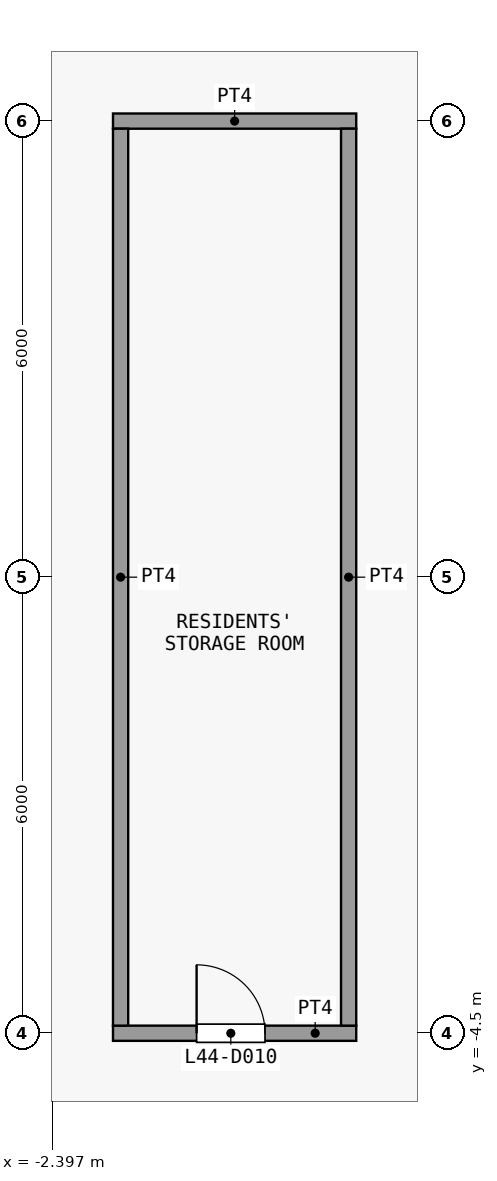
"""IFC4 building model, lengths in metres.
Left out: names, types, materials, properties, quantities, classifications, styles, units other than length and angle.
Written with IfcOpenShell. Run it as: python <this file> out.ifc"""

import sys

from ifc_helpers import new_model, si_unit, direction, frame, frame_2d, origin, place, context, subcontext, project, spatial, rectangle, extrude, element, fill, save


model = new_model("IFC4")
c1 = context("Model", 3, precision=1e-05, world=origin(), true_north=direction((0.0, 1.0)))
c2 = subcontext(c1, "Body", "Model", "MODEL_VIEW")
j1 = project(units=[si_unit("LENGTHUNIT", "METRE"), si_unit("PLANEANGLEUNIT", "RADIAN")], contexts=[c1])
p1 = place(None, origin())
s1 = spatial("IfcSite", under=j1, at=p1, CompositionType="ELEMENT")
p2 = place(p1, origin())
s2 = spatial("IfcBuilding", under=s1, at=p2, CompositionType="ELEMENT")
p3 = place(p2, frame((0.0, 0.0, 178.1)))
s3 = spatial("IfcBuildingStorey", under=s2, at=p3, CompositionType="ELEMENT", Elevation=178.1)
p4 = place(p3, frame((-1.6, -4.5, 0.0), z_axis=(0.0, 0.0, 1.0), x_axis=(1.0, 0.0, 0.0)))
e1 = element("IfcWall", 1, at=p4, inside=s3, PredefinedType="PARTITIONING", context=c2, shape_type="SweptSolid", body=[
    extrude(rectangle(XDim=3.2, YDim=0.2, at=frame_2d((1.6, 0.0))), origin(), (0.0, 0.0, 1.0), 3.3),
])
p5 = place(p4, frame((1.1, 0.0, 0.0)))
e2 = element("IfcOpeningElement", 2, at=p5, cuts=e1, PredefinedType="OPENING", context=c2, shape_type="SweptSolid", body=[
    extrude(rectangle(XDim=0.9, YDim=2.1, at=frame_2d((0.45, 1.05))), frame((0.0, 0.11, 0.0), z_axis=(0.0, -1.0, 0.0), x_axis=(1.0, 0.0, 0.0)), (0.0, 0.0, 1.0), 0.22),
])
p6 = place(p3, frame((-1.6, 7.5, 0.0), z_axis=(0.0, 0.0, 1.0), x_axis=(1.0, 0.0, 0.0)))
e3 = element("IfcWall", 3, at=p6, inside=s3, PredefinedType="PARTITIONING", context=c2, shape_type="SweptSolid", body=[
    extrude(rectangle(XDim=3.2, YDim=0.2, at=frame_2d((1.6, 0.0))), origin(), (0.0, 0.0, 1.0), 3.3),
])
for number, where, z_axis, x_axis in (
    (4, (-1.5, -4.4, 0.0), (0.0, 0.0, 1.0), (0.0, 1.0, 0.0)),
    (5, (1.5, -4.4, 0.0), (0.0, 0.0, 1.0), (0.0, 1.0, 0.0)),
):
    element("IfcWall", number, at=place(p3, frame(where, z_axis=z_axis, x_axis=x_axis)), inside=s3, PredefinedType="PARTITIONING", context=c2, shape_type="SweptSolid", body=[
        extrude(rectangle(XDim=11.8, YDim=0.2, at=frame_2d((5.9, 0.0))), origin(), (0.0, 0.0, 1.0), 3.3),
    ])
p7 = place(p5, origin())
e6 = element("IfcDoor", 6, at=p7, inside=s3, OperationType="SINGLE_SWING_RIGHT", PredefinedType="DOOR", context=c2, shape_type="SweptSolid", body=[
    extrude(rectangle(XDim=0.9, YDim=2.1, at=frame_2d((0.45, 1.05))), frame((0.0, 0.025, 0.0), z_axis=(0.0, -1.0, 0.0), x_axis=(1.0, 0.0, 0.0)), (0.0, 0.0, 1.0), 0.05),
])
fill(e2, e6)
save(model, sys.argv[1])
